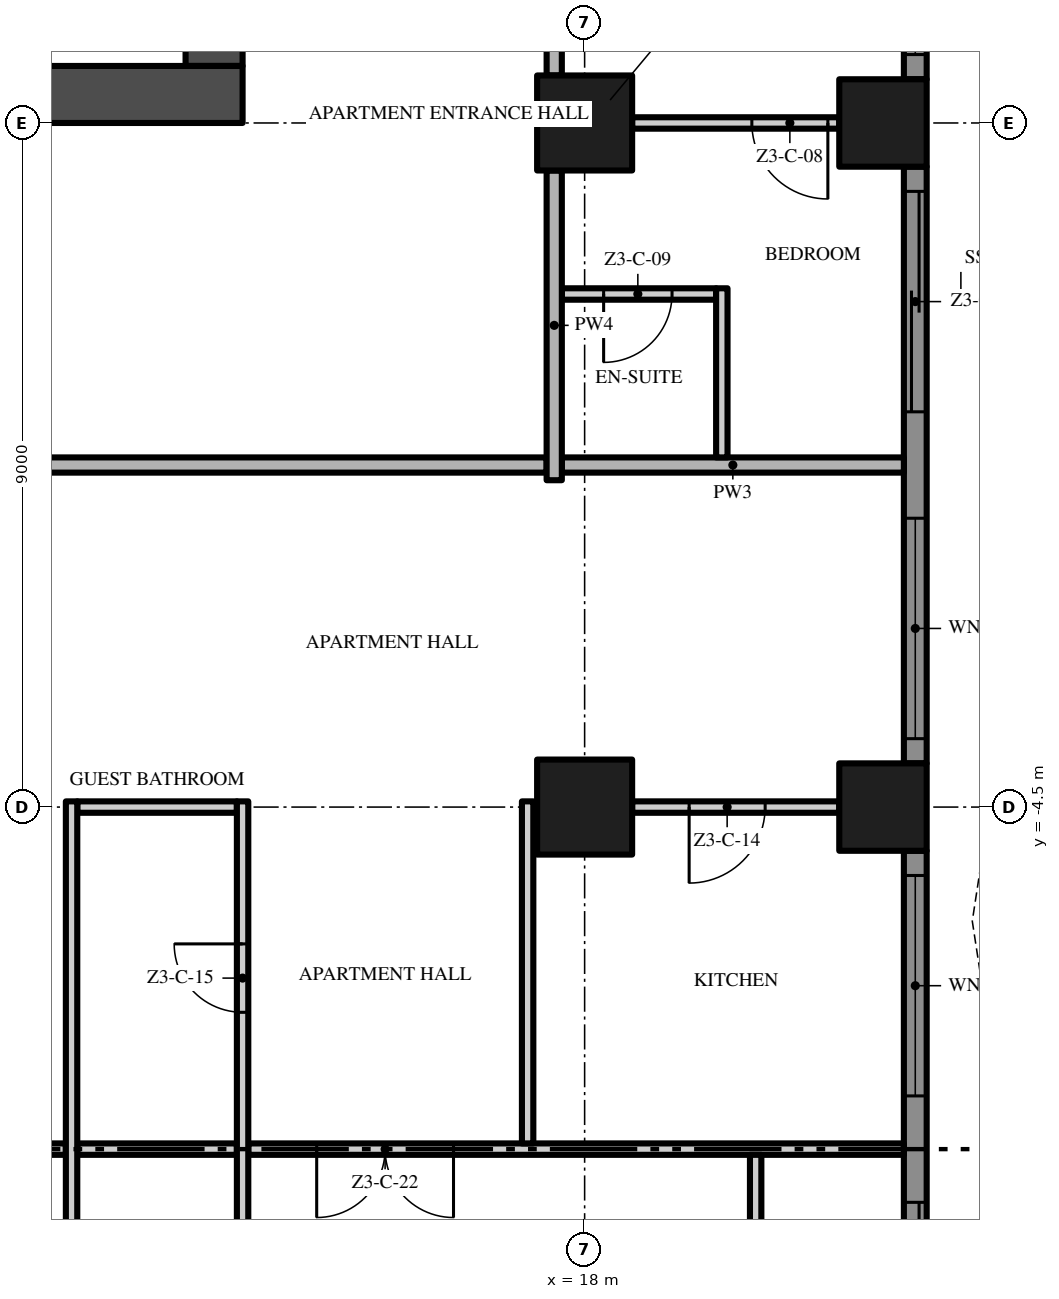
"""IFC4 building model, lengths in metres.
Left out: names, types, materials, properties, quantities, classifications, styles, units other than length and angle.
Written with IfcOpenShell. Run it as: python <this file> out.ifc"""

import sys

from ifc_helpers import new_model, si_unit, direction, frame, frame_2d, origin, origin_2d, place, context, subcontext, project, spatial, polyline, rectangle, outline, extrude, element, fill, save


model = new_model("IFC4")
c1 = context("Model", 3, precision=1e-05, world=origin(), true_north=direction((0.0, 1.0)))
c2 = subcontext(c1, "Body", "Model", "MODEL_VIEW")
j1 = project(units=[si_unit("LENGTHUNIT", "METRE"), si_unit("PLANEANGLEUNIT", "RADIAN")], contexts=[c1])
p1 = place(None, origin())
s1 = spatial("IfcSite", under=j1, at=p1, CompositionType="ELEMENT")
p2 = place(p1, origin())
s2 = spatial("IfcBuilding", under=s1, at=p2, CompositionType="ELEMENT")
p3 = place(p2, frame((0.0, 0.0, 151.6)))
s3 = spatial("IfcBuildingStorey", under=s2, at=p3, CompositionType="ELEMENT", Elevation=151.6)
p4 = place(p3, frame((-13.5, 4.875, -0.3), z_axis=(0.0, 0.0, 1.0), x_axis=(1.0, 0.0, 0.0)))
e1 = element("IfcWall", 1, at=p4, inside=s3, PredefinedType="SHEAR", context=c2, shape_type="SweptSolid", body=[
    extrude(rectangle(XDim=27.0, YDim=0.75, at=frame_2d((13.5, 0.0))), origin(), (0.0, 0.0, 1.0), 3.8),
])
p5 = place(p4, frame((12.0, 0.0, 0.3)))
e2 = element("IfcOpeningElement", 2, at=p5, cuts=e1, PredefinedType="OPENING", context=c2, shape_type="SweptSolid", body=[
    extrude(rectangle(XDim=3.0, YDim=2.4, at=frame_2d((1.5, 1.2))), frame((0.0, 0.385, 0.0), z_axis=(0.0, -1.0, 0.0), x_axis=(1.0, 0.0, 0.0)), (0.0, 0.0, 1.0), 0.77),
])
p6 = place(p4, frame((4.9, 0.0, 0.3)))
e3 = element("IfcOpeningElement", 3, at=p6, cuts=e1, PredefinedType="OPENING", context=c2, shape_type="SweptSolid", body=[
    extrude(rectangle(XDim=1.2, YDim=2.2, at=frame_2d((0.6, 1.1))), frame((0.0, 0.385, 0.0), z_axis=(0.0, -1.0, 0.0), x_axis=(1.0, 0.0, 0.0)), (0.0, 0.0, 1.0), 0.77),
])
p7 = place(p4, frame((20.75, 0.0, 0.3)))
e4 = element("IfcOpeningElement", 4, at=p7, cuts=e1, PredefinedType="OPENING", context=c2, shape_type="SweptSolid", body=[
    extrude(rectangle(XDim=1.5, YDim=2.2, at=frame_2d((0.75, 1.1))), frame((0.0, 0.385, 0.0), z_axis=(0.0, -1.0, 0.0), x_axis=(1.0, 0.0, 0.0)), (0.0, 0.0, 1.0), 0.77),
])
p8 = place(p4, frame((17.4, 0.0, 0.3)))
e5 = element("IfcOpeningElement", 5, at=p8, cuts=e1, PredefinedType="OPENING", context=c2, shape_type="SweptSolid", body=[
    extrude(rectangle(XDim=1.2, YDim=2.2, at=frame_2d((0.6, 1.1))), frame((0.0, 0.385, 0.0), z_axis=(0.0, -1.0, 0.0), x_axis=(1.0, 0.0, 0.0)), (0.0, 0.0, 1.0), 0.77),
])
p9 = place(p3, frame((13.125, 5.25, -0.3), z_axis=(0.0, 0.0, 1.0), x_axis=(0.0, 1.0, 0.0)))
e6 = element("IfcWall", 6, at=p9, inside=s3, PredefinedType="SHEAR", context=c2, shape_type="SweptSolid", body=[
    extrude(rectangle(XDim=16.5, YDim=0.75, at=frame_2d((8.25, 0.0))), origin(), (0.0, 0.0, 1.0), 3.8),
])
p10 = place(p9, frame((6.15, 0.0, 0.3)))
e7 = element("IfcOpeningElement", 7, at=p10, cuts=e6, PredefinedType="OPENING", context=c2, shape_type="SweptSolid", body=[
    extrude(rectangle(XDim=1.2, YDim=2.2, at=frame_2d((0.6, 1.1))), frame((0.0, 0.385, 0.0), z_axis=(0.0, -1.0, 0.0), x_axis=(1.0, 0.0, 0.0)), (0.0, 0.0, 1.0), 0.77),
])
for number, where, z_axis, x_axis in (
    (8, (18.0, -4.5, 0.0), (0.0, 0.0, 1.0), (1.0, 0.0, 0.0)),
    (9, (18.0, 4.5, 0.0), (0.0, 0.0, 1.0), (1.0, 0.0, 0.0)),
):
    element("IfcColumn", number, at=place(p3, frame(where, z_axis=z_axis, x_axis=x_axis)), inside=s3, PredefinedType="COLUMN", context=c2, shape_type="SweptSolid", body=[
        extrude(rectangle(XDim=1.25, YDim=1.25, at=origin_2d()), origin(), (0.0, 0.0, 1.0), 3.5),
    ])
for number, where, z_axis, x_axis in (
    (10, (21.925, -4.5, 0.0), (0.0, 0.0, 1.0), (1.0, 0.0, 0.0)),
    (11, (21.925, 4.5, 0.0), (0.0, 0.0, 1.0), (1.0, 0.0, 0.0)),
):
    element("IfcColumn", number, at=place(p3, frame(where, z_axis=z_axis, x_axis=x_axis)), inside=s3, PredefinedType="COLUMN", context=c2, shape_type="SweptSolid", body=[
        extrude(rectangle(XDim=1.15, YDim=1.15, at=origin_2d()), origin(), (0.0, 0.0, 1.0), 3.5),
    ])
p11 = place(p3, frame((22.35, -5.075, 0.0), z_axis=(0.0, 0.0, 1.0), x_axis=(0.0, -1.0, 0.0)))
e12 = element("IfcWall", 12, at=p11, inside=s3, PredefinedType="SOLIDWALL", context=c2, shape_type="SweptSolid", body=[
    extrude(rectangle(XDim=7.275, YDim=0.3, at=frame_2d((3.638, 0.0))), origin(), (0.0, 0.0, 1.0), 3.5),
])
p12 = place(p11, frame((4.625, 0.0, 0.0)))
e13 = element("IfcOpeningElement", 13, at=p12, cuts=e12, PredefinedType="OPENING", context=c2, shape_type="SweptSolid", body=[
    extrude(rectangle(XDim=2.35, YDim=2.4, at=frame_2d((1.175, 1.2))), frame((0.0, 0.16, 0.0), z_axis=(0.0, -1.0, 0.0), x_axis=(1.0, 0.0, 0.0)), (0.0, 0.0, 1.0), 0.32),
])
p13 = place(p11, frame((0.325, 0.0, 0.45)))
e14 = element("IfcOpeningElement", 14, at=p13, cuts=e12, PredefinedType="OPENING", context=c2, shape_type="SweptSolid", body=[
    extrude(rectangle(XDim=2.9, YDim=2.65, at=frame_2d((1.45, 1.325))), frame((0.0, 0.16, 0.0), z_axis=(0.0, -1.0, 0.0), x_axis=(1.0, 0.0, 0.0)), (0.0, 0.0, 1.0), 0.32),
])
p14 = place(p3, frame((22.35, 3.925, 0.0), z_axis=(0.0, 0.0, 1.0), x_axis=(0.0, -1.0, 0.0)))
e15 = element("IfcWall", 15, at=p14, inside=s3, PredefinedType="SOLIDWALL", context=c2, shape_type="SweptSolid", body=[
    extrude(rectangle(XDim=7.85, YDim=0.3, at=frame_2d((3.925, 0.0))), origin(), (0.0, 0.0, 1.0), 3.5),
])
p15 = place(p14, frame((4.625, 0.0, 0.45)))
e16 = element("IfcOpeningElement", 16, at=p15, cuts=e15, PredefinedType="OPENING", context=c2, shape_type="SweptSolid", body=[
    extrude(rectangle(XDim=2.9, YDim=2.65, at=frame_2d((1.45, 1.325))), frame((0.0, 0.16, 0.0), z_axis=(0.0, -1.0, 0.0), x_axis=(1.0, 0.0, 0.0)), (0.0, 0.0, 1.0), 0.32),
])
p16 = place(p14, frame((0.325, 0.0, 0.0)))
e17 = element("IfcOpeningElement", 17, at=p16, cuts=e15, PredefinedType="OPENING", context=c2, shape_type="SweptSolid", body=[
    extrude(rectangle(XDim=2.9, YDim=2.4, at=frame_2d((1.45, 1.2))), frame((0.0, 0.16, 0.0), z_axis=(0.0, -1.0, 0.0), x_axis=(1.0, 0.0, 0.0)), (0.0, 0.0, 1.0), 0.32),
])
p17 = place(p3, frame((22.35, 12.925, 0.0), z_axis=(0.0, 0.0, 1.0), x_axis=(0.0, -1.0, 0.0)))
e18 = element("IfcWall", 18, at=p17, inside=s3, PredefinedType="SOLIDWALL", context=c2, shape_type="SweptSolid", body=[
    extrude(rectangle(XDim=7.85, YDim=0.3, at=frame_2d((3.925, 0.0))), origin(), (0.0, 0.0, 1.0), 3.5),
])
p18 = place(p17, frame((4.625, 0.0, 0.45)))
e19 = element("IfcOpeningElement", 19, at=p18, cuts=e18, PredefinedType="OPENING", context=c2, shape_type="SweptSolid", body=[
    extrude(rectangle(XDim=2.9, YDim=2.65, at=frame_2d((1.45, 1.325))), frame((0.0, 0.16, 0.0), z_axis=(0.0, -1.0, 0.0), x_axis=(1.0, 0.0, 0.0)), (0.0, 0.0, 1.0), 0.32),
])
p19 = place(p17, frame((0.325, 0.0, 0.45)))
e20 = element("IfcOpeningElement", 20, at=p19, cuts=e18, PredefinedType="OPENING", context=c2, shape_type="SweptSolid", body=[
    extrude(rectangle(XDim=2.9, YDim=2.65, at=frame_2d((1.45, 1.325))), frame((0.0, 0.16, 0.0), z_axis=(0.0, -1.0, 0.0), x_axis=(1.0, 0.0, 0.0)), (0.0, 0.0, 1.0), 0.32),
])
p20 = place(p3, origin())
e21 = element("IfcWall", 21, at=p20, inside=s3, PredefinedType="USERDEFINED", context=c2, shape_type="SweptSolid", body=[
    extrude(outline(polyline([(25.5, -13.5), (25.271, -12.0), (24.671, -10.5), (23.929, -9.0), (23.329, -7.5), (23.1, -6.0), (23.329, -4.5), (23.929, -3.0), (24.671, -1.5), (25.271, 0.0), (25.5, 1.5), (25.271, 3.0), (24.671, 4.5), (23.929, 6.0), (23.329, 7.5), (23.1, 9.0), (23.329, 10.5), (23.929, 12.0), (24.671, 13.5), (25.271, 15.0), (25.5, 16.5), (25.271, 18.0), (25.024, 17.962), (25.247, 16.5), (25.028, 15.066), (24.442, 13.602), (23.701, 12.102), (23.086, 10.566), (22.847, 9.0), (23.086, 7.434), (23.701, 5.898), (24.442, 4.398), (25.028, 2.934), (25.247, 1.5), (25.028, 0.066), (24.442, -1.398), (23.701, -2.898), (23.086, -4.434), (22.847, -6.0), (23.086, -7.566), (23.701, -9.102), (24.442, -10.602), (25.028, -12.066), (25.253, -13.538), (25.5, -13.5)])), origin(), (0.0, 0.0, 1.0), 0.9),
])
p21 = place(p3, frame((11.175, -9.0, 0.0), z_axis=(0.0, 0.0, 1.0), x_axis=(-1.0, 0.0, 0.0)))
e22 = element("IfcWall", 22, at=p21, inside=s3, PredefinedType="PARTITIONING", context=c2, shape_type="SweptSolid", body=[
    extrude(rectangle(XDim=4.35, YDim=0.15, at=frame_2d((2.175, 0.0))), origin(), (0.0, 0.0, 1.0), 3.5),
])
p22 = place(p21, frame((0.575, 0.0, 0.0)))
e23 = element("IfcOpeningElement", 23, at=p22, cuts=e22, PredefinedType="OPENING", context=c2, shape_type="SweptSolid", body=[
    extrude(rectangle(XDim=1.0, YDim=2.4, at=frame_2d((0.5, 1.2))), frame((0.0, 0.085, 0.0), z_axis=(0.0, -1.0, 0.0), x_axis=(1.0, 0.0, 0.0)), (0.0, 0.0, 1.0), 0.17),
])
p23 = place(p21, frame((2.8, 0.0, 0.0)))
e24 = element("IfcOpeningElement", 24, at=p23, cuts=e22, PredefinedType="OPENING", context=c2, shape_type="SweptSolid", body=[
    extrude(rectangle(XDim=1.0, YDim=2.4, at=frame_2d((0.5, 1.2))), frame((0.0, 0.085, 0.0), z_axis=(0.0, -1.0, 0.0), x_axis=(1.0, 0.0, 0.0)), (0.0, 0.0, 1.0), 0.17),
])
p24 = place(p3, frame((11.325, -9.0, 0.0), z_axis=(0.0, 0.0, 1.0), x_axis=(1.0, 0.0, 0.0)))
e25 = element("IfcWall", 25, at=p24, inside=s3, PredefinedType="PARTITIONING", context=c2, shape_type="SweptSolid", body=[
    extrude(rectangle(XDim=2.1, YDim=0.15, at=frame_2d((1.05, 0.0))), origin(), (0.0, 0.0, 1.0), 3.5),
])
p25 = place(p3, frame((22.2, -9.0, 0.0), z_axis=(0.0, 0.0, 1.0), x_axis=(-1.0, 0.0, 0.0)))
e26 = element("IfcWall", 26, at=p25, inside=s3, PredefinedType="PARTITIONING", context=c2, shape_type="SweptSolid", body=[
    extrude(rectangle(XDim=8.625, YDim=0.15, at=frame_2d((4.312, 0.0))), origin(), (0.0, 0.0, 1.0), 3.5),
])
p26 = place(p25, frame((5.925, 0.0, 0.0)))
e27 = element("IfcOpeningElement", 27, at=p26, cuts=e26, PredefinedType="OPENING", context=c2, shape_type="SweptSolid", body=[
    extrude(rectangle(XDim=1.8, YDim=2.4, at=frame_2d((0.9, 1.2))), frame((0.0, 0.085, 0.0), z_axis=(0.0, -1.0, 0.0), x_axis=(1.0, 0.0, 0.0)), (0.0, 0.0, 1.0), 0.17),
])
p27 = place(p3, frame((11.325, -4.5, 0.0), z_axis=(0.0, 0.0, 1.0), x_axis=(1.0, 0.0, 0.0)))
e28 = element("IfcWall", 28, at=p27, inside=s3, PredefinedType="PARTITIONING", context=c2, shape_type="SweptSolid", body=[
    extrude(rectangle(XDim=2.1, YDim=0.15, at=frame_2d((1.05, 0.0))), origin(), (0.0, 0.0, 1.0), 3.5),
])
p28 = place(p3, frame((21.35, -4.5, 0.0), z_axis=(0.0, 0.0, 1.0), x_axis=(-1.0, 0.0, 0.0)))
e29 = element("IfcWall", 29, at=p28, inside=s3, PredefinedType="PARTITIONING", context=c2, shape_type="SweptSolid", body=[
    extrude(rectangle(XDim=2.725, YDim=0.15, at=frame_2d((1.363, 0.0))), origin(), (0.0, 0.0, 1.0), 3.5),
])
p29 = place(p28, frame((0.975, 0.0, 0.0)))
e30 = element("IfcOpeningElement", 30, at=p29, cuts=e29, PredefinedType="OPENING", context=c2, shape_type="SweptSolid", body=[
    extrude(rectangle(XDim=1.0, YDim=2.4, at=frame_2d((0.5, 1.2))), frame((0.0, 0.085, 0.0), z_axis=(0.0, -1.0, 0.0), x_axis=(1.0, 0.0, 0.0)), (0.0, 0.0, 1.0), 0.17),
])
p30 = place(p3, frame((17.5, 0.0, 0.0), z_axis=(0.0, 0.0, 1.0), x_axis=(-1.0, 0.0, 0.0)))
e31 = element("IfcWall", 31, at=p30, inside=s3, PredefinedType="PARTITIONING", context=c2, shape_type="SweptSolid", body=[
    extrude(rectangle(XDim=35.0, YDim=0.2, at=frame_2d((17.5, 0.0))), origin(), (0.0, 0.0, 1.0), 3.5),
])
p31 = place(p30, frame((16.75, 0.0, 0.0)))
e32 = element("IfcOpeningElement", 32, at=p31, cuts=e31, PredefinedType="OPENING", context=c2, shape_type="SweptSolid", body=[
    extrude(rectangle(XDim=1.5, YDim=2.4, at=frame_2d((0.75, 1.2))), frame((0.0, 0.11, 0.0), z_axis=(0.0, -1.0, 0.0), x_axis=(1.0, 0.0, 0.0)), (0.0, 0.0, 1.0), 0.22),
])
p32 = place(p3, frame((17.7, 0.0, 0.0), z_axis=(0.0, 0.0, 1.0), x_axis=(1.0, 0.0, 0.0)))
e33 = element("IfcWall", 33, at=p32, inside=s3, PredefinedType="PARTITIONING", context=c2, shape_type="SweptSolid", body=[
    extrude(rectangle(XDim=4.5, YDim=0.2, at=frame_2d((2.25, 0.0))), origin(), (0.0, 0.0, 1.0), 3.5),
])
p33 = place(p3, frame((19.73, 2.25, 0.0), z_axis=(0.0, 0.0, 1.0), x_axis=(-1.0, 0.0, 0.0)))
e34 = element("IfcWall", 34, at=p33, inside=s3, PredefinedType="PARTITIONING", context=c2, shape_type="SweptSolid", body=[
    extrude(rectangle(XDim=2.03, YDim=0.15, at=frame_2d((1.015, 0.0))), origin(), (0.0, 0.0, 1.0), 3.5),
])
p34 = place(p33, frame((0.58, 0.0, 0.0)))
e35 = element("IfcOpeningElement", 35, at=p34, cuts=e34, PredefinedType="OPENING", context=c2, shape_type="SweptSolid", body=[
    extrude(rectangle(XDim=0.9, YDim=2.1, at=frame_2d((0.45, 1.05))), frame((0.0, 0.085, 0.0), z_axis=(0.0, -1.0, 0.0), x_axis=(1.0, 0.0, 0.0)), (0.0, 0.0, 1.0), 0.17),
])
p35 = place(p3, frame((21.35, 4.5, 0.0), z_axis=(0.0, 0.0, 1.0), x_axis=(-1.0, 0.0, 0.0)))
e36 = element("IfcWall", 36, at=p35, inside=s3, PredefinedType="PARTITIONING", context=c2, shape_type="SweptSolid", body=[
    extrude(rectangle(XDim=2.725, YDim=0.15, at=frame_2d((1.363, 0.0))), origin(), (0.0, 0.0, 1.0), 3.5),
])
p36 = place(p35, frame((0.15, 0.0, 0.0)))
e37 = element("IfcOpeningElement", 37, at=p36, cuts=e36, PredefinedType="OPENING", context=c2, shape_type="SweptSolid", body=[
    extrude(rectangle(XDim=1.0, YDim=2.4, at=frame_2d((0.5, 1.2))), frame((0.0, 0.085, 0.0), z_axis=(0.0, -1.0, 0.0), x_axis=(1.0, 0.0, 0.0)), (0.0, 0.0, 1.0), 0.17),
])
p37 = place(p3, frame((11.25, -12.075, 0.0), z_axis=(0.0, 0.0, 1.0), x_axis=(0.0, 1.0, 0.0)))
e38 = element("IfcWall", 38, at=p37, inside=s3, PredefinedType="PARTITIONING", context=c2, shape_type="SweptSolid", body=[
    extrude(rectangle(XDim=7.65, YDim=0.15, at=frame_2d((3.825, 0.0))), origin(), (0.0, 0.0, 1.0), 3.5),
])
p38 = place(p3, frame((13.5, -17.7, 0.0), z_axis=(0.0, 0.0, 1.0), x_axis=(0.0, 1.0, 0.0)))
e39 = element("IfcWall", 39, at=p38, inside=s3, PredefinedType="PARTITIONING", context=c2, shape_type="SweptSolid", body=[
    extrude(rectangle(XDim=13.275, YDim=0.15, at=frame_2d((6.638, 0.0))), origin(), (0.0, 0.0, 1.0), 3.5),
])
p39 = place(p38, frame((10.5, 0.0, 0.0)))
e40 = element("IfcOpeningElement", 40, at=p39, cuts=e39, PredefinedType="OPENING", context=c2, shape_type="SweptSolid", body=[
    extrude(rectangle(XDim=0.9, YDim=2.1, at=frame_2d((0.45, 1.05))), frame((0.0, 0.085, 0.0), z_axis=(0.0, -1.0, 0.0), x_axis=(1.0, 0.0, 0.0)), (0.0, 0.0, 1.0), 0.17),
])
p40 = place(p3, frame((17.25, -8.925, 0.0), z_axis=(0.0, 0.0, 1.0), x_axis=(0.0, 1.0, 0.0)))
e41 = element("IfcWall", 41, at=p40, inside=s3, PredefinedType="PARTITIONING", context=c2, shape_type="SweptSolid", body=[
    extrude(rectangle(XDim=4.5, YDim=0.15, at=frame_2d((2.25, 0.0))), origin(), (0.0, 0.0, 1.0), 3.5),
])
p41 = place(p3, frame((17.6, -0.2, 0.0), z_axis=(0.0, 0.0, 1.0), x_axis=(0.0, 1.0, 0.0)))
e42 = element("IfcWall", 42, at=p41, inside=s3, PredefinedType="PARTITIONING", context=c2, shape_type="SweptSolid", body=[
    extrude(rectangle(XDim=4.075, YDim=0.2, at=frame_2d((2.038, 0.0))), origin(), (0.0, 0.0, 1.0), 3.5),
])
p42 = place(p3, frame((17.6, 12.875, 0.0), z_axis=(0.0, 0.0, 1.0), x_axis=(0.0, -1.0, 0.0)))
e43 = element("IfcWall", 43, at=p42, inside=s3, PredefinedType="PARTITIONING", context=c2, shape_type="SweptSolid", body=[
    extrude(rectangle(XDim=7.75, YDim=0.2, at=frame_2d((3.875, 0.0))), origin(), (0.0, 0.0, 1.0), 3.5),
])
p43 = place(p42, frame((5.55, 0.0, 0.0)))
e44 = element("IfcOpeningElement", 44, at=p43, cuts=e43, PredefinedType="OPENING", context=c2, shape_type="SweptSolid", body=[
    extrude(rectangle(XDim=1.2, YDim=2.4, at=frame_2d((0.6, 1.2))), frame((0.0, 0.11, 0.0), z_axis=(0.0, -1.0, 0.0), x_axis=(1.0, 0.0, 0.0)), (0.0, 0.0, 1.0), 0.22),
])
p44 = place(p3, frame((19.805, 0.1, 0.0), z_axis=(0.0, 0.0, 1.0), x_axis=(0.0, 1.0, 0.0)))
e45 = element("IfcWall", 45, at=p44, inside=s3, PredefinedType="PARTITIONING", context=c2, shape_type="SweptSolid", body=[
    extrude(rectangle(XDim=2.225, YDim=0.15, at=frame_2d((1.113, 0.0))), origin(), (0.0, 0.0, 1.0), 3.5),
])
p45 = place(p3, frame((20.25, -9.075, 0.0), z_axis=(0.0, 0.0, 1.0), x_axis=(0.0, -1.0, 0.0)))
e46 = element("IfcWall", 46, at=p45, inside=s3, PredefinedType="PARTITIONING", context=c2, shape_type="SweptSolid", body=[
    extrude(rectangle(XDim=3.0, YDim=0.15, at=frame_2d((1.5, 0.0))), origin(), (0.0, 0.0, 1.0), 3.5),
])
p46 = place(p45, frame((0.975, 0.0, 0.0)))
e47 = element("IfcOpeningElement", 47, at=p46, cuts=e46, PredefinedType="OPENING", context=c2, shape_type="SweptSolid", body=[
    extrude(rectangle(XDim=0.9, YDim=2.1, at=frame_2d((0.45, 1.05))), frame((0.0, 0.085, 0.0), z_axis=(0.0, -1.0, 0.0), x_axis=(1.0, 0.0, 0.0)), (0.0, 0.0, 1.0), 0.17),
])
p47 = place(p12, origin())
e48 = element("IfcDoor", 48, at=p47, inside=s3, OperationType="SINGLE_SWING_LEFT", PredefinedType="DOOR", context=c2, shape_type="SweptSolid", body=[
    extrude(rectangle(XDim=2.35, YDim=2.4, at=frame_2d((1.175, 1.2))), frame((0.0, 0.025, 0.0), z_axis=(0.0, -1.0, 0.0), x_axis=(1.0, 0.0, 0.0)), (0.0, 0.0, 1.0), 0.05),
])
fill(e13, e48)
p48 = place(p13, origin())
e49 = element("IfcWindow", 49, at=p48, inside=s3, PartitioningType="SINGLE_PANEL", PredefinedType="WINDOW", context=c2, shape_type="SweptSolid", body=[
    extrude(rectangle(XDim=2.9, YDim=2.65, at=frame_2d((1.45, 1.325))), frame((0.0, 0.03, 0.0), z_axis=(0.0, -1.0, 0.0), x_axis=(1.0, 0.0, 0.0)), (0.0, 0.0, 1.0), 0.06),
])
fill(e14, e49)
p49 = place(p15, origin())
e50 = element("IfcWindow", 50, at=p49, inside=s3, PartitioningType="SINGLE_PANEL", PredefinedType="WINDOW", context=c2, shape_type="SweptSolid", body=[
    extrude(rectangle(XDim=2.9, YDim=2.65, at=frame_2d((1.45, 1.325))), frame((0.0, 0.03, 0.0), z_axis=(0.0, -1.0, 0.0), x_axis=(1.0, 0.0, 0.0)), (0.0, 0.0, 1.0), 0.06),
])
fill(e16, e50)
p50 = place(p16, origin())
e51 = element("IfcDoor", 51, at=p50, inside=s3, OperationType="SINGLE_SWING_LEFT", PredefinedType="DOOR", context=c2, shape_type="SweptSolid", body=[
    extrude(rectangle(XDim=2.9, YDim=2.4, at=frame_2d((1.45, 1.2))), frame((0.0, 0.025, 0.0), z_axis=(0.0, -1.0, 0.0), x_axis=(1.0, 0.0, 0.0)), (0.0, 0.0, 1.0), 0.05),
])
fill(e17, e51)
p51 = place(p18, origin())
e52 = element("IfcWindow", 52, at=p51, inside=s3, PartitioningType="SINGLE_PANEL", PredefinedType="WINDOW", context=c2, shape_type="SweptSolid", body=[
    extrude(rectangle(XDim=2.9, YDim=2.65, at=frame_2d((1.45, 1.325))), frame((0.0, 0.03, 0.0), z_axis=(0.0, -1.0, 0.0), x_axis=(1.0, 0.0, 0.0)), (0.0, 0.0, 1.0), 0.06),
])
fill(e19, e52)
p52 = place(p36, origin())
e53 = element("IfcDoor", 53, at=p52, inside=s3, OperationType="SINGLE_SWING_LEFT", PredefinedType="DOOR", context=c2, shape_type="SweptSolid", body=[
    extrude(rectangle(XDim=1.0, YDim=2.4, at=frame_2d((0.5, 1.2))), frame((0.0, 0.025, 0.0), z_axis=(0.0, -1.0, 0.0), x_axis=(1.0, 0.0, 0.0)), (0.0, 0.0, 1.0), 0.05),
])
fill(e37, e53)
p53 = place(p34, origin())
e54 = element("IfcDoor", 54, at=p53, inside=s3, OperationType="SINGLE_SWING_RIGHT", PredefinedType="DOOR", context=c2, shape_type="SweptSolid", body=[
    extrude(rectangle(XDim=0.9, YDim=2.1, at=frame_2d((0.45, 1.05))), frame((0.0, 0.025, 0.0), z_axis=(0.0, -1.0, 0.0), x_axis=(1.0, 0.0, 0.0)), (0.0, 0.0, 1.0), 0.05),
])
fill(e35, e54)
p54 = place(p29, origin())
e55 = element("IfcDoor", 55, at=p54, inside=s3, OperationType="SINGLE_SWING_RIGHT", PredefinedType="DOOR", context=c2, shape_type="SweptSolid", body=[
    extrude(rectangle(XDim=1.0, YDim=2.4, at=frame_2d((0.5, 1.2))), frame((0.0, 0.025, 0.0), z_axis=(0.0, -1.0, 0.0), x_axis=(1.0, 0.0, 0.0)), (0.0, 0.0, 1.0), 0.05),
])
fill(e30, e55)
p55 = place(p39, origin())
e56 = element("IfcDoor", 56, at=p55, inside=s3, OperationType="SINGLE_SWING_RIGHT", PredefinedType="DOOR", context=c2, shape_type="SweptSolid", body=[
    extrude(rectangle(XDim=0.9, YDim=2.1, at=frame_2d((0.45, 1.05))), frame((0.0, 0.025, 0.0), z_axis=(0.0, -1.0, 0.0), x_axis=(1.0, 0.0, 0.0)), (0.0, 0.0, 1.0), 0.05),
])
fill(e40, e56)
p56 = place(p26, origin())
e57 = element("IfcDoor", 57, at=p56, inside=s3, OperationType="DOUBLE_DOOR_SINGLE_SWING", PredefinedType="DOOR", context=c2, shape_type="SweptSolid", body=[
    extrude(rectangle(XDim=1.8, YDim=2.4, at=frame_2d((0.9, 1.2))), frame((0.0, 0.025, 0.0), z_axis=(0.0, -1.0, 0.0), x_axis=(1.0, 0.0, 0.0)), (0.0, 0.0, 1.0), 0.05),
])
fill(e27, e57)
save(model, sys.argv[1])
